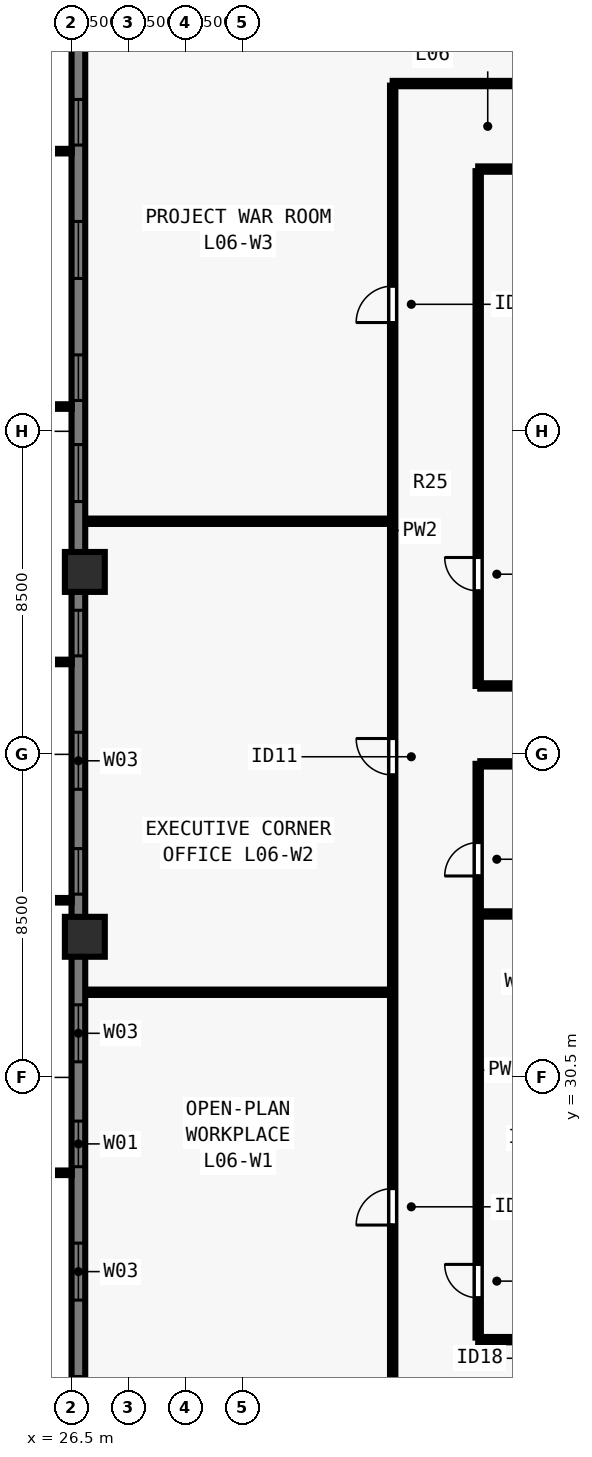
"""IFC4 building model, lengths in metres.
Left out: names, types, materials, properties, quantities, classifications, styles, units other than length and angle.
Written with IfcOpenShell. Run it as: python <this file> out.ifc"""

import sys

from ifc_helpers import new_model, si_unit, direction, frame, frame_2d, origin, origin_2d, place, context, subcontext, project, spatial, rectangle, extrude, element, fill, save


model = new_model("IFC4")
c1 = context("Model", 3, precision=1e-05, world=origin(), true_north=direction((0.0, 1.0)))
c2 = subcontext(c1, "Body", "Model", "MODEL_VIEW")
j1 = project(units=[si_unit("LENGTHUNIT", "METRE"), si_unit("PLANEANGLEUNIT", "RADIAN")], contexts=[c1])
p1 = place(None, origin())
s1 = spatial("IfcSite", under=j1, at=p1, CompositionType="ELEMENT")
p2 = place(p1, origin())
s2 = spatial("IfcBuilding", under=s1, at=p2, CompositionType="ELEMENT")
p3 = place(p2, frame((0.0, 0.0, 27.0)))
s3 = spatial("IfcBuildingStorey", under=s2, at=p3, CompositionType="ELEMENT", Elevation=27.0)
for number, where, z_axis, x_axis in (
    (1, (26.85, 43.8, 0.0), (0.0, 0.0, 1.0), (0.0, 1.0, 0.0)),
    (2, (26.85, 34.2, 0.0), (0.0, 0.0, 1.0), (0.0, 1.0, 0.0)),
):
    element("IfcColumn", number, at=place(p3, frame(where, z_axis=z_axis, x_axis=x_axis)), inside=s3, PredefinedType="COLUMN", context=c2, shape_type="SweptSolid", body=[
        extrude(rectangle(XDim=1.05, YDim=1.05, at=origin_2d()), origin(), (0.0, 0.0, 1.0), 3.5),
    ])
p4 = place(p3, frame((26.68, 16.5, 0.0), z_axis=(0.0, 0.0, 1.0), x_axis=(0.0, 1.0, 0.0)))
e3 = element("IfcWall", 3, at=p4, inside=s3, PredefinedType="SOLIDWALL", context=c2, shape_type="SweptSolid", body=[
    extrude(rectangle(XDim=44.662, YDim=0.36, at=frame_2d((22.331, 0.0))), origin(), (0.0, 0.0, 1.0), 3.28),
])
p5 = place(p4, frame((4.93, 0.0, 0.8)))
e4 = element("IfcOpeningElement", 4, at=p5, cuts=e3, PredefinedType="OPENING", context=c2, shape_type="SweptSolid", body=[
    extrude(rectangle(XDim=1.2, YDim=1.544, at=frame_2d((0.6, 0.772))), frame((0.0, 0.19, 0.0), z_axis=(0.0, -1.0, 0.0), x_axis=(1.0, 0.0, 0.0)), (0.0, 0.0, 1.0), 0.38),
])
p6 = place(p4, frame((8.14, 0.0, 0.8)))
e5 = element("IfcOpeningElement", 5, at=p6, cuts=e3, PredefinedType="OPENING", context=c2, shape_type="SweptSolid", body=[
    extrude(rectangle(XDim=1.5, YDim=1.544, at=frame_2d((0.75, 0.772))), frame((0.0, 0.19, 0.0), z_axis=(0.0, -1.0, 0.0), x_axis=(1.0, 0.0, 0.0)), (0.0, 0.0, 1.0), 0.38),
])
p7 = place(p4, frame((11.65, 0.0, 0.8)))
e6 = element("IfcOpeningElement", 6, at=p7, cuts=e3, PredefinedType="OPENING", context=c2, shape_type="SweptSolid", body=[
    extrude(rectangle(XDim=1.2, YDim=1.544, at=frame_2d((0.6, 0.772))), frame((0.0, 0.19, 0.0), z_axis=(0.0, -1.0, 0.0), x_axis=(1.0, 0.0, 0.0)), (0.0, 0.0, 1.0), 0.38),
])
p8 = place(p4, frame((14.411, 0.0, 0.8)))
e7 = element("IfcOpeningElement", 7, at=p8, cuts=e3, PredefinedType="OPENING", context=c2, shape_type="SweptSolid", body=[
    extrude(rectangle(XDim=1.5, YDim=1.544, at=frame_2d((0.75, 0.772))), frame((0.0, 0.19, 0.0), z_axis=(0.0, -1.0, 0.0), x_axis=(1.0, 0.0, 0.0)), (0.0, 0.0, 1.0), 0.38),
])
p9 = place(p4, frame((18.821, 0.0, 0.8)))
e8 = element("IfcOpeningElement", 8, at=p9, cuts=e3, PredefinedType="OPENING", context=c2, shape_type="SweptSolid", body=[
    extrude(rectangle(XDim=1.2, YDim=1.544, at=frame_2d((0.6, 0.772))), frame((0.0, 0.19, 0.0), z_axis=(0.0, -1.0, 0.0), x_axis=(1.0, 0.0, 0.0)), (0.0, 0.0, 1.0), 0.38),
])
p10 = place(p4, frame((21.581, 0.0, 0.8)))
e9 = element("IfcOpeningElement", 9, at=p10, cuts=e3, PredefinedType="OPENING", context=c2, shape_type="SweptSolid", body=[
    extrude(rectangle(XDim=1.5, YDim=1.544, at=frame_2d((0.75, 0.772))), frame((0.0, 0.19, 0.0), z_axis=(0.0, -1.0, 0.0), x_axis=(1.0, 0.0, 0.0)), (0.0, 0.0, 1.0), 0.38),
])
p11 = place(p4, frame((25.091, 0.0, 0.8)))
e10 = element("IfcOpeningElement", 10, at=p11, cuts=e3, PredefinedType="OPENING", context=c2, shape_type="SweptSolid", body=[
    extrude(rectangle(XDim=1.2, YDim=1.544, at=frame_2d((0.6, 0.772))), frame((0.0, 0.19, 0.0), z_axis=(0.0, -1.0, 0.0), x_axis=(1.0, 0.0, 0.0)), (0.0, 0.0, 1.0), 0.38),
])
p12 = place(p4, frame((29.151, 0.0, 0.8)))
e11 = element("IfcOpeningElement", 11, at=p12, cuts=e3, PredefinedType="OPENING", context=c2, shape_type="SweptSolid", body=[
    extrude(rectangle(XDim=1.5, YDim=1.544, at=frame_2d((0.75, 0.772))), frame((0.0, 0.19, 0.0), z_axis=(0.0, -1.0, 0.0), x_axis=(1.0, 0.0, 0.0)), (0.0, 0.0, 1.0), 0.38),
])
p13 = place(p4, frame((31.812, 0.0, 0.8)))
e12 = element("IfcOpeningElement", 12, at=p13, cuts=e3, PredefinedType="OPENING", context=c2, shape_type="SweptSolid", body=[
    extrude(rectangle(XDim=1.2, YDim=1.544, at=frame_2d((0.6, 0.772))), frame((0.0, 0.19, 0.0), z_axis=(0.0, -1.0, 0.0), x_axis=(1.0, 0.0, 0.0)), (0.0, 0.0, 1.0), 0.38),
])
p14 = place(p4, frame((35.022, 0.0, 0.8)))
e13 = element("IfcOpeningElement", 13, at=p14, cuts=e3, PredefinedType="OPENING", context=c2, shape_type="SweptSolid", body=[
    extrude(rectangle(XDim=1.5, YDim=1.544, at=frame_2d((0.75, 0.772))), frame((0.0, 0.19, 0.0), z_axis=(0.0, -1.0, 0.0), x_axis=(1.0, 0.0, 0.0)), (0.0, 0.0, 1.0), 0.38),
])
p15 = place(p4, frame((38.532, 0.0, 0.8)))
e14 = element("IfcOpeningElement", 14, at=p15, cuts=e3, PredefinedType="OPENING", context=c2, shape_type="SweptSolid", body=[
    extrude(rectangle(XDim=1.2, YDim=1.544, at=frame_2d((0.6, 0.772))), frame((0.0, 0.19, 0.0), z_axis=(0.0, -1.0, 0.0), x_axis=(1.0, 0.0, 0.0)), (0.0, 0.0, 1.0), 0.38),
])
p16 = place(p3, frame((34.95, 56.65, 0.0), z_axis=(0.0, 0.0, 1.0), x_axis=(1.0, 0.0, 0.0)))
e15 = element("IfcWall", 15, at=p16, inside=s3, PredefinedType="PARTITIONING", context=c2, shape_type="SweptSolid", body=[
    extrude(rectangle(XDim=34.1, YDim=0.14, at=frame_2d((17.05, 0.0))), origin(), (0.0, 0.0, 1.0), 3.28),
])
p17 = place(p16, frame((4.522, 0.0, 0.0)))
e16 = element("IfcOpeningElement", 16, at=p17, cuts=e15, PredefinedType="OPENING", context=c2, shape_type="SweptSolid", body=[
    extrude(rectangle(XDim=0.96, YDim=2.12, at=frame_2d((0.48, 1.06))), frame((0.0, 0.08, 0.0), z_axis=(0.0, -1.0, 0.0), x_axis=(1.0, 0.0, 0.0)), (0.0, 0.0, 1.0), 0.16),
])
p18 = place(p16, frame((29.202, 0.0, 0.0)))
e17 = element("IfcOpeningElement", 17, at=p18, cuts=e15, PredefinedType="OPENING", context=c2, shape_type="SweptSolid", body=[
    extrude(rectangle(XDim=0.96, YDim=2.12, at=frame_2d((0.48, 1.06))), frame((0.0, 0.08, 0.0), z_axis=(0.0, -1.0, 0.0), x_axis=(1.0, 0.0, 0.0)), (0.0, 0.0, 1.0), 0.16),
])
p19 = place(p3, frame((34.95, 21.405, 0.0), z_axis=(0.0, 0.0, 1.0), x_axis=(0.0, 1.0, 0.0)))
e18 = element("IfcWall", 18, at=p19, inside=s3, PredefinedType="PARTITIONING", context=c2, shape_type="SweptSolid", body=[
    extrude(rectangle(XDim=35.19, YDim=0.14, at=frame_2d((17.595, 0.0))), origin(), (0.0, 0.0, 1.0), 3.28),
])
p20 = place(p19, frame((5.21, 0.0, 0.0)))
e19 = element("IfcOpeningElement", 19, at=p20, cuts=e18, PredefinedType="OPENING", context=c2, shape_type="SweptSolid", body=[
    extrude(rectangle(XDim=0.96, YDim=2.12, at=frame_2d((0.48, 1.06))), frame((0.0, 0.08, 0.0), z_axis=(0.0, -1.0, 0.0), x_axis=(1.0, 0.0, 0.0)), (0.0, 0.0, 1.0), 0.16),
])
p21 = place(p19, frame((17.052, 0.0, 0.0)))
e20 = element("IfcOpeningElement", 20, at=p21, cuts=e18, PredefinedType="OPENING", context=c2, shape_type="SweptSolid", body=[
    extrude(rectangle(XDim=0.96, YDim=2.12, at=frame_2d((0.48, 1.06))), frame((0.0, 0.08, 0.0), z_axis=(0.0, -1.0, 0.0), x_axis=(1.0, 0.0, 0.0)), (0.0, 0.0, 1.0), 0.16),
])
p22 = place(p19, frame((28.957, 0.0, 0.0)))
e21 = element("IfcOpeningElement", 21, at=p22, cuts=e18, PredefinedType="OPENING", context=c2, shape_type="SweptSolid", body=[
    extrude(rectangle(XDim=0.96, YDim=2.12, at=frame_2d((0.48, 1.06))), frame((0.0, 0.08, 0.0), z_axis=(0.0, -1.0, 0.0), x_axis=(1.0, 0.0, 0.0)), (0.0, 0.0, 1.0), 0.16),
])
p23 = place(p3, frame((37.2, 23.6, 0.0), z_axis=(0.0, 0.0, 1.0), x_axis=(1.0, 0.0, 0.0)))
e22 = element("IfcWall", 22, at=p23, inside=s3, PredefinedType="PARTITIONING", context=c2, shape_type="SweptSolid", body=[
    extrude(rectangle(XDim=29.6, YDim=0.14, at=frame_2d((14.8, 0.0))), origin(), (0.0, 0.0, 1.0), 3.28),
])
p24 = place(p23, frame((1.2, 0.0, 0.0)))
e23 = element("IfcOpeningElement", 23, at=p24, cuts=e22, PredefinedType="OPENING", context=c2, shape_type="SweptSolid", body=[
    extrude(rectangle(XDim=0.88, YDim=2.1, at=frame_2d((0.44, 1.05))), frame((0.0, 0.08, 0.0), z_axis=(0.0, -1.0, 0.0), x_axis=(1.0, 0.0, 0.0)), (0.0, 0.0, 1.0), 0.16),
])
p25 = place(p23, frame((11.3, 0.0, 0.0)))
e24 = element("IfcOpeningElement", 24, at=p25, cuts=e22, PredefinedType="OPENING", context=c2, shape_type="SweptSolid", body=[
    extrude(rectangle(XDim=0.88, YDim=2.1, at=frame_2d((0.44, 1.05))), frame((0.0, 0.08, 0.0), z_axis=(0.0, -1.0, 0.0), x_axis=(1.0, 0.0, 0.0)), (0.0, 0.0, 1.0), 0.16),
])
p26 = place(p23, frame((21.8, 0.0, 0.0)))
e25 = element("IfcOpeningElement", 25, at=p26, cuts=e22, PredefinedType="OPENING", context=c2, shape_type="SweptSolid", body=[
    extrude(rectangle(XDim=0.88, YDim=2.1, at=frame_2d((0.44, 1.05))), frame((0.0, 0.08, 0.0), z_axis=(0.0, -1.0, 0.0), x_axis=(1.0, 0.0, 0.0)), (0.0, 0.0, 1.0), 0.16),
])
p27 = place(p3, frame((37.2, 54.4, 0.0), z_axis=(0.0, 0.0, 1.0), x_axis=(1.0, 0.0, 0.0)))
e26 = element("IfcWall", 26, at=p27, inside=s3, PredefinedType="PARTITIONING", context=c2, shape_type="SweptSolid", body=[
    extrude(rectangle(XDim=29.6, YDim=0.14, at=frame_2d((14.8, 0.0))), origin(), (0.0, 0.0, 1.0), 3.28),
])
p28 = place(p27, frame((2.2, 0.0, 0.0)))
e27 = element("IfcOpeningElement", 27, at=p28, cuts=e26, PredefinedType="OPENING", context=c2, shape_type="SweptSolid", body=[
    extrude(rectangle(XDim=0.88, YDim=2.1, at=frame_2d((0.44, 1.05))), frame((0.0, 0.08, 0.0), z_axis=(0.0, -1.0, 0.0), x_axis=(1.0, 0.0, 0.0)), (0.0, 0.0, 1.0), 0.16),
])
p29 = place(p27, frame((15.3, 0.0, 0.0)))
e28 = element("IfcOpeningElement", 28, at=p29, cuts=e26, PredefinedType="OPENING", context=c2, shape_type="SweptSolid", body=[
    extrude(rectangle(XDim=0.88, YDim=2.1, at=frame_2d((0.44, 1.05))), frame((0.0, 0.08, 0.0), z_axis=(0.0, -1.0, 0.0), x_axis=(1.0, 0.0, 0.0)), (0.0, 0.0, 1.0), 0.16),
])
p30 = place(p27, frame((24.8, 0.0, 0.0)))
e29 = element("IfcOpeningElement", 29, at=p30, cuts=e26, PredefinedType="OPENING", context=c2, shape_type="SweptSolid", body=[
    extrude(rectangle(XDim=0.88, YDim=2.1, at=frame_2d((0.44, 1.05))), frame((0.0, 0.08, 0.0), z_axis=(0.0, -1.0, 0.0), x_axis=(1.0, 0.0, 0.0)), (0.0, 0.0, 1.0), 0.16),
])
p31 = place(p3, frame((37.2, 23.655, 0.0), z_axis=(0.0, 0.0, 1.0), x_axis=(0.0, 1.0, 0.0)))
e30 = element("IfcWall", 30, at=p31, inside=s3, PredefinedType="PARTITIONING", context=c2, shape_type="SweptSolid", body=[
    extrude(rectangle(XDim=15.095, YDim=0.14, at=frame_2d((7.547, 0.0))), origin(), (0.0, 0.0, 1.0), 3.28),
])
p32 = place(p31, frame((1.045, 0.0, 0.0)))
e31 = element("IfcOpeningElement", 31, at=p32, cuts=e30, PredefinedType="OPENING", context=c2, shape_type="SweptSolid", body=[
    extrude(rectangle(XDim=0.88, YDim=2.1, at=frame_2d((0.44, 1.05))), frame((0.0, 0.08, 0.0), z_axis=(0.0, -1.0, 0.0), x_axis=(1.0, 0.0, 0.0)), (0.0, 0.0, 1.0), 0.16),
])
p33 = place(p31, frame((12.145, 0.0, 0.0)))
e32 = element("IfcOpeningElement", 32, at=p33, cuts=e30, PredefinedType="OPENING", context=c2, shape_type="SweptSolid", body=[
    extrude(rectangle(XDim=0.88, YDim=2.1, at=frame_2d((0.44, 1.05))), frame((0.0, 0.08, 0.0), z_axis=(0.0, -1.0, 0.0), x_axis=(1.0, 0.0, 0.0)), (0.0, 0.0, 1.0), 0.16),
])
p34 = place(p3, frame((37.2, 40.8, 0.0), z_axis=(0.0, 0.0, 1.0), x_axis=(0.0, 1.0, 0.0)))
e33 = element("IfcWall", 33, at=p34, inside=s3, PredefinedType="PARTITIONING", context=c2, shape_type="SweptSolid", body=[
    extrude(rectangle(XDim=13.545, YDim=0.14, at=frame_2d((6.772, 0.0))), origin(), (0.0, 0.0, 1.0), 3.28),
])
p35 = place(p34, frame((2.5, 0.0, 0.0)))
e34 = element("IfcOpeningElement", 34, at=p35, cuts=e33, PredefinedType="OPENING", context=c2, shape_type="SweptSolid", body=[
    extrude(rectangle(XDim=0.88, YDim=2.1, at=frame_2d((0.44, 1.05))), frame((0.0, 0.08, 0.0), z_axis=(0.0, -1.0, 0.0), x_axis=(1.0, 0.0, 0.0)), (0.0, 0.0, 1.0), 0.16),
])
for number, where, z_axis, x_axis in (
    (35, (37.255, 38.75, 0.0), (0.0, 0.0, 1.0), (1.0, 0.0, 0.0)),
    (36, (37.255, 40.8, 0.0), (0.0, 0.0, 1.0), (1.0, 0.0, 0.0)),
    (37, (37.255, 34.8, 0.0), (0.0, 0.0, 1.0), (1.0, 0.0, 0.0)),
):
    element("IfcWall", number, at=place(p3, frame(where, z_axis=z_axis, x_axis=x_axis)), inside=s3, PredefinedType="PARTITIONING", context=c2, shape_type="SweptSolid", body=[
        extrude(rectangle(XDim=5.985, YDim=0.14, at=frame_2d((2.993, 0.0))), origin(), (0.0, 0.0, 1.0), 3.28),
    ])
for number, where, z_axis, x_axis in (
    (38, (26.92, 32.74, 0.0), (0.0, 0.0, 1.0), (1.0, 0.0, 0.0)),
    (39, (26.92, 45.134, 0.0), (0.0, 0.0, 1.0), (1.0, 0.0, 0.0)),
):
    element("IfcWall", number, at=place(p3, frame(where, z_axis=z_axis, x_axis=x_axis)), inside=s3, PredefinedType="PARTITIONING", context=c2, shape_type="SweptSolid", body=[
        extrude(rectangle(XDim=7.93, YDim=0.14, at=frame_2d((3.965, 0.0))), origin(), (0.0, 0.0, 1.0), 2.439),
    ])
p36 = place(p5, origin())
e40 = element("IfcWindow", 40, at=p36, inside=s3, PartitioningType="SINGLE_PANEL", PredefinedType="WINDOW", context=c2, shape_type="SweptSolid", body=[
    extrude(rectangle(XDim=1.2, YDim=1.544, at=frame_2d((0.6, 0.772))), frame((0.0, -0.05, 0.0), z_axis=(0.0, -1.0, 0.0), x_axis=(1.0, 0.0, 0.0)), (0.0, 0.0, 1.0), 0.06),
])
fill(e4, e40)
p37 = place(p6, origin())
e41 = element("IfcWindow", 41, at=p37, inside=s3, PartitioningType="SINGLE_PANEL", PredefinedType="WINDOW", context=c2, shape_type="SweptSolid", body=[
    extrude(rectangle(XDim=1.5, YDim=1.544, at=frame_2d((0.75, 0.772))), frame((0.0, -0.05, 0.0), z_axis=(0.0, -1.0, 0.0), x_axis=(1.0, 0.0, 0.0)), (0.0, 0.0, 1.0), 0.06),
])
fill(e5, e41)
p38 = place(p7, origin())
e42 = element("IfcWindow", 42, at=p38, inside=s3, PartitioningType="SINGLE_PANEL", PredefinedType="WINDOW", context=c2, shape_type="SweptSolid", body=[
    extrude(rectangle(XDim=1.2, YDim=1.544, at=frame_2d((0.6, 0.772))), frame((0.0, -0.05, 0.0), z_axis=(0.0, -1.0, 0.0), x_axis=(1.0, 0.0, 0.0)), (0.0, 0.0, 1.0), 0.06),
])
fill(e6, e42)
p39 = place(p8, origin())
e43 = element("IfcWindow", 43, at=p39, inside=s3, PartitioningType="SINGLE_PANEL", PredefinedType="WINDOW", context=c2, shape_type="SweptSolid", body=[
    extrude(rectangle(XDim=1.5, YDim=1.544, at=frame_2d((0.75, 0.772))), frame((0.0, -0.05, 0.0), z_axis=(0.0, -1.0, 0.0), x_axis=(1.0, 0.0, 0.0)), (0.0, 0.0, 1.0), 0.06),
])
fill(e7, e43)
p40 = place(p9, origin())
e44 = element("IfcWindow", 44, at=p40, inside=s3, PartitioningType="SINGLE_PANEL", PredefinedType="WINDOW", context=c2, shape_type="SweptSolid", body=[
    extrude(rectangle(XDim=1.2, YDim=1.544, at=frame_2d((0.6, 0.772))), frame((0.0, -0.05, 0.0), z_axis=(0.0, -1.0, 0.0), x_axis=(1.0, 0.0, 0.0)), (0.0, 0.0, 1.0), 0.06),
])
fill(e8, e44)
p41 = place(p10, origin())
e45 = element("IfcWindow", 45, at=p41, inside=s3, PartitioningType="SINGLE_PANEL", PredefinedType="WINDOW", context=c2, shape_type="SweptSolid", body=[
    extrude(rectangle(XDim=1.5, YDim=1.544, at=frame_2d((0.75, 0.772))), frame((0.0, -0.05, 0.0), z_axis=(0.0, -1.0, 0.0), x_axis=(1.0, 0.0, 0.0)), (0.0, 0.0, 1.0), 0.06),
])
fill(e9, e45)
p42 = place(p11, origin())
e46 = element("IfcWindow", 46, at=p42, inside=s3, PartitioningType="SINGLE_PANEL", PredefinedType="WINDOW", context=c2, shape_type="SweptSolid", body=[
    extrude(rectangle(XDim=1.2, YDim=1.544, at=frame_2d((0.6, 0.772))), frame((0.0, -0.05, 0.0), z_axis=(0.0, -1.0, 0.0), x_axis=(1.0, 0.0, 0.0)), (0.0, 0.0, 1.0), 0.06),
])
fill(e10, e46)
p43 = place(p12, origin())
e47 = element("IfcWindow", 47, at=p43, inside=s3, PartitioningType="SINGLE_PANEL", PredefinedType="WINDOW", context=c2, shape_type="SweptSolid", body=[
    extrude(rectangle(XDim=1.5, YDim=1.544, at=frame_2d((0.75, 0.772))), frame((0.0, -0.05, 0.0), z_axis=(0.0, -1.0, 0.0), x_axis=(1.0, 0.0, 0.0)), (0.0, 0.0, 1.0), 0.06),
])
fill(e11, e47)
p44 = place(p13, origin())
e48 = element("IfcWindow", 48, at=p44, inside=s3, PartitioningType="SINGLE_PANEL", PredefinedType="WINDOW", context=c2, shape_type="SweptSolid", body=[
    extrude(rectangle(XDim=1.2, YDim=1.544, at=frame_2d((0.6, 0.772))), frame((0.0, -0.05, 0.0), z_axis=(0.0, -1.0, 0.0), x_axis=(1.0, 0.0, 0.0)), (0.0, 0.0, 1.0), 0.06),
])
fill(e12, e48)
p45 = place(p14, origin())
e49 = element("IfcWindow", 49, at=p45, inside=s3, PartitioningType="SINGLE_PANEL", PredefinedType="WINDOW", context=c2, shape_type="SweptSolid", body=[
    extrude(rectangle(XDim=1.5, YDim=1.544, at=frame_2d((0.75, 0.772))), frame((0.0, -0.05, 0.0), z_axis=(0.0, -1.0, 0.0), x_axis=(1.0, 0.0, 0.0)), (0.0, 0.0, 1.0), 0.06),
])
fill(e13, e49)
p46 = place(p15, origin())
e50 = element("IfcWindow", 50, at=p46, inside=s3, PartitioningType="SINGLE_PANEL", PredefinedType="WINDOW", context=c2, shape_type="SweptSolid", body=[
    extrude(rectangle(XDim=1.2, YDim=1.544, at=frame_2d((0.6, 0.772))), frame((0.0, -0.05, 0.0), z_axis=(0.0, -1.0, 0.0), x_axis=(1.0, 0.0, 0.0)), (0.0, 0.0, 1.0), 0.06),
])
fill(e14, e50)
p47 = place(p32, origin())
e51 = element("IfcDoor", 51, at=p47, inside=s3, OperationType="SINGLE_SWING_RIGHT", PredefinedType="DOOR", context=c2, shape_type="SweptSolid", body=[
    extrude(rectangle(XDim=0.88, YDim=2.1, at=frame_2d((0.44, 1.05))), frame((0.0, 0.025, 0.0), z_axis=(0.0, -1.0, 0.0), x_axis=(1.0, 0.0, 0.0)), (0.0, 0.0, 1.0), 0.05),
])
fill(e31, e51)
p48 = place(p33, origin())
e52 = element("IfcDoor", 52, at=p48, inside=s3, OperationType="SINGLE_SWING_LEFT", PredefinedType="DOOR", context=c2, shape_type="SweptSolid", body=[
    extrude(rectangle(XDim=0.88, YDim=2.1, at=frame_2d((0.44, 1.05))), frame((0.0, 0.025, 0.0), z_axis=(0.0, -1.0, 0.0), x_axis=(1.0, 0.0, 0.0)), (0.0, 0.0, 1.0), 0.05),
])
fill(e32, e52)
p49 = place(p35, origin())
e53 = element("IfcDoor", 53, at=p49, inside=s3, OperationType="SINGLE_SWING_RIGHT", PredefinedType="DOOR", context=c2, shape_type="SweptSolid", body=[
    extrude(rectangle(XDim=0.88, YDim=2.1, at=frame_2d((0.44, 1.05))), frame((0.0, 0.025, 0.0), z_axis=(0.0, -1.0, 0.0), x_axis=(1.0, 0.0, 0.0)), (0.0, 0.0, 1.0), 0.05),
])
fill(e34, e53)
p50 = place(p20, origin())
e54 = element("IfcDoor", 54, at=p50, inside=s3, OperationType="SINGLE_SWING_LEFT", PredefinedType="DOOR", context=c2, shape_type="SweptSolid", body=[
    extrude(rectangle(XDim=0.96, YDim=2.12, at=frame_2d((0.48, 1.06))), frame((0.0, 0.025, 0.0), z_axis=(0.0, -1.0, 0.0), x_axis=(1.0, 0.0, 0.0)), (0.0, 0.0, 1.0), 0.05),
])
fill(e19, e54)
p51 = place(p21, origin())
e55 = element("IfcDoor", 55, at=p51, inside=s3, OperationType="SINGLE_SWING_RIGHT", PredefinedType="DOOR", context=c2, shape_type="SweptSolid", body=[
    extrude(rectangle(XDim=0.96, YDim=2.12, at=frame_2d((0.48, 1.06))), frame((0.0, 0.025, 0.0), z_axis=(0.0, -1.0, 0.0), x_axis=(1.0, 0.0, 0.0)), (0.0, 0.0, 1.0), 0.05),
])
fill(e20, e55)
p52 = place(p22, origin())
e56 = element("IfcDoor", 56, at=p52, inside=s3, OperationType="SINGLE_SWING_LEFT", PredefinedType="DOOR", context=c2, shape_type="SweptSolid", body=[
    extrude(rectangle(XDim=0.96, YDim=2.12, at=frame_2d((0.48, 1.06))), frame((0.0, 0.025, 0.0), z_axis=(0.0, -1.0, 0.0), x_axis=(1.0, 0.0, 0.0)), (0.0, 0.0, 1.0), 0.05),
])
fill(e21, e56)
save(model, sys.argv[1])
